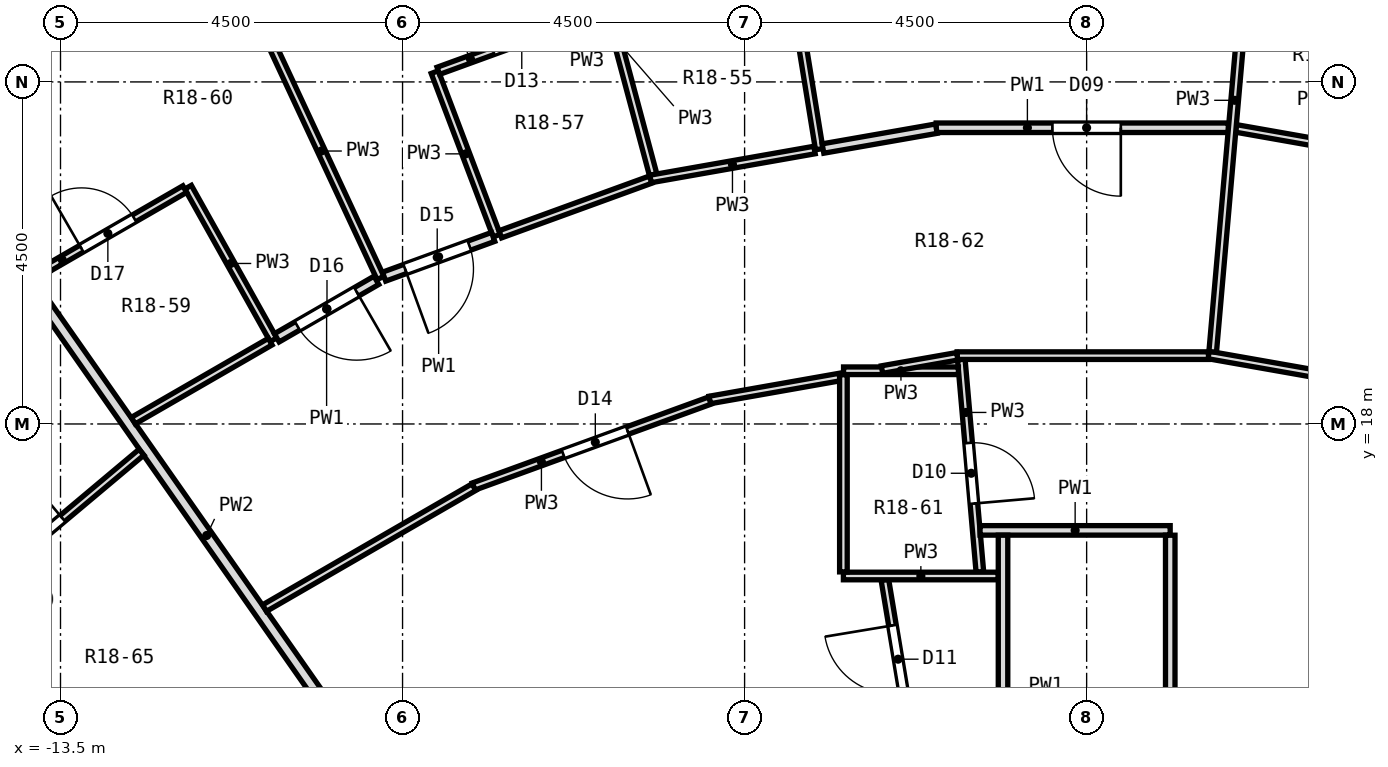
"""IFC4 building model, lengths in metres.
Left out: names, types, materials, properties, quantities, classifications, styles, units other than length and angle.
Written with IfcOpenShell. Run it as: python <this file> out.ifc"""

import sys

from ifc_helpers import new_model, si_unit, direction, frame, frame_2d, origin, place, context, subcontext, project, spatial, rectangle, extrude, element, fill, save


model = new_model("IFC4")
c1 = context("Model", 3, precision=1e-05, world=origin(), true_north=direction((0.0, 1.0)))
c2 = subcontext(c1, "Body", "Model", "MODEL_VIEW")
j1 = project(units=[si_unit("LENGTHUNIT", "METRE"), si_unit("PLANEANGLEUNIT", "RADIAN")], contexts=[c1])
p1 = place(None, origin())
s1 = spatial("IfcSite", under=j1, at=p1, CompositionType="ELEMENT")
p2 = place(p1, origin())
s2 = spatial("IfcBuilding", under=s1, at=p2, CompositionType="ELEMENT")
p3 = place(p2, frame((0.0, 0.0, 101.8)))
s3 = spatial("IfcBuildingStorey", under=s2, at=p3, CompositionType="ELEMENT", Elevation=101.8)
p4 = place(p3, frame((-1.649, 18.849, 0.0), z_axis=(0.0, 0.0, 1.0), x_axis=(0.087061215869, -0.996202963603, 0.0)))
e1 = element("IfcWall", 1, at=p4, inside=s3, PredefinedType="PARTITIONING", context=c2, shape_type="SweptSolid", body=[
    extrude(rectangle(XDim=2.807, YDim=0.1, at=frame_2d((1.404, 0.0))), origin(), (0.0, 0.0, 1.0), 2.8),
])
p5 = place(p4, frame((1.103, 0.0, 0.0)))
e2 = element("IfcOpeningElement", 2, at=p5, cuts=e1, PredefinedType="OPENING", context=c2, shape_type="SweptSolid", body=[
    extrude(rectangle(XDim=0.8, YDim=2.1, at=frame_2d((0.4, 1.05))), frame((0.0, 0.062, 0.0), z_axis=(0.0, -1.0, 0.0), x_axis=(1.0, 0.0, 0.0)), (0.0, 0.0, 1.0), 0.124),
])
p6 = place(p3, frame((-3.887, 23.885, 0.0), z_axis=(0.0, 0.0, 1.0), x_axis=(0.160403826344, -0.987051474085, 0.0)))
e3 = element("IfcWall", 3, at=p6, inside=s3, PredefinedType="PARTITIONING", context=c2, shape_type="SweptSolid", body=[
    extrude(rectangle(XDim=2.3, YDim=0.1, at=frame_2d((1.15, 0.0))), origin(), (0.0, 0.0, 1.0), 2.8),
])
p7 = place(p3, frame((-2.655, 15.951, 0.0), z_axis=(0.0, 0.0, 1.0), x_axis=(0.164012054584, -0.986458334625, 0.0)))
e4 = element("IfcWall", 4, at=p7, inside=s3, PredefinedType="PARTITIONING", context=c2, shape_type="SweptSolid", body=[
    extrude(rectangle(XDim=4.707, YDim=0.1, at=frame_2d((2.354, 0.0))), origin(), (0.0, 0.0, 1.0), 2.8),
])
p8 = place(p7, frame((0.61, 0.0, 0.0)))
e5 = element("IfcOpeningElement", 5, at=p8, cuts=e4, PredefinedType="OPENING", context=c2, shape_type="SweptSolid", body=[
    extrude(rectangle(XDim=0.9, YDim=2.1, at=frame_2d((0.45, 1.05))), frame((0.0, 0.062, 0.0), z_axis=(0.0, -1.0, 0.0), x_axis=(1.0, 0.0, 0.0)), (0.0, 0.0, 1.0), 0.124),
])
p9 = place(p3, frame((-6.642, 24.791, 0.0), z_axis=(0.0, 0.0, 1.0), x_axis=(0.258373404153, -0.966045125254, 0.0)))
e6 = element("IfcWall", 6, at=p9, inside=s3, PredefinedType="PARTITIONING", context=c2, shape_type="SweptSolid", body=[
    extrude(rectangle(XDim=3.634, YDim=0.1, at=frame_2d((1.817, 0.0))), origin(), (0.0, 0.0, 1.0), 2.8),
])
p10 = place(p3, frame((-8.576, 22.629, 0.0), z_axis=(0.0, 0.0, 1.0), x_axis=(0.354308635081, -0.935128542558, 0.0)))
e7 = element("IfcWall", 7, at=p10, inside=s3, PredefinedType="PARTITIONING", context=c2, shape_type="SweptSolid", body=[
    extrude(rectangle(XDim=2.3, YDim=0.1, at=frame_2d((1.15, 0.0))), origin(), (0.0, 0.0, 1.0), 2.8),
])
p11 = place(p3, frame((-10.847, 23.26, 0.0), z_axis=(0.0, 0.0, 1.0), x_axis=(0.422500901097, -0.906362503953, 0.0)))
e8 = element("IfcWall", 8, at=p11, inside=s3, PredefinedType="PARTITIONING", context=c2, shape_type="SweptSolid", body=[
    extrude(rectangle(XDim=3.684, YDim=0.1, at=frame_2d((1.842, 0.0))), origin(), (0.0, 0.0, 1.0), 2.8),
])
p12 = place(p3, frame((-11.822, 21.115, 0.0), z_axis=(0.0, 0.0, 1.0), x_axis=(0.488622759198, -0.872495157117, 0.0)))
e9 = element("IfcWall", 9, at=p12, inside=s3, PredefinedType="PARTITIONING", context=c2, shape_type="SweptSolid", body=[
    extrude(rectangle(XDim=2.3, YDim=0.1, at=frame_2d((1.15, 0.0))), origin(), (0.0, 0.0, 1.0), 2.8),
])
p13 = place(p3, frame((-13.896, 19.846, 0.0), z_axis=(0.0, 0.0, 1.0), x_axis=(0.573571733859, -0.819155336989, 0.0)))
e10 = element("IfcWall", 10, at=p13, inside=s3, PredefinedType="PARTITIONING", context=c2, shape_type="SweptSolid", body=[
    extrude(rectangle(XDim=8.088, YDim=0.15, at=frame_2d((4.044, 0.0))), origin(), (0.0, 0.0, 1.0), 2.8),
])
p14 = place(p3, frame((-15.731, 14.697, 0.0), z_axis=(0.0, 0.0, 1.0), x_axis=(0.730698385908, -0.682700423928, 0.0)))
e11 = element("IfcWall", 11, at=p14, inside=s3, PredefinedType="PARTITIONING", context=c2, shape_type="SweptSolid", body=[
    extrude(rectangle(XDim=3.026, YDim=0.1, at=frame_2d((1.513, 0.0))), origin(), (0.0, 0.0, 1.0), 2.8),
])
p15 = place(p3, frame((1.603, 18.908, 0.0), z_axis=(0.0, 0.0, 1.0), x_axis=(0.984831814927, -0.173511660439, 0.0)))
e12 = element("IfcWall", 12, at=p15, inside=s3, PredefinedType="PARTITIONING", context=c2, shape_type="SweptSolid", body=[
    extrude(rectangle(XDim=3.308, YDim=0.1, at=frame_2d((1.654, 0.0))), origin(), (0.0, 0.0, 1.0), 2.8),
])
p16 = place(p3, frame((1.965, 21.888, 0.0), z_axis=(0.0, 0.0, 1.0), x_axis=(0.984784733711, -0.173778676048, 0.0)))
e13 = element("IfcWall", 13, at=p16, inside=s3, PredefinedType="PARTITIONING", context=c2, shape_type="SweptSolid", body=[
    extrude(rectangle(XDim=2.092, YDim=0.1, at=frame_2d((1.046, 0.0))), origin(), (0.0, 0.0, 1.0), 2.8),
])
p17 = place(p3, frame((-3.2, 16.0, 0.0), z_axis=(0.0, 0.0, 1.0), x_axis=(1.0, 0.0, 0.0)))
e14 = element("IfcWall", 14, at=p17, inside=s3, PredefinedType="PARTITIONING", context=c2, shape_type="SweptSolid", body=[
    extrude(rectangle(XDim=2.037, YDim=0.1, at=frame_2d((1.019, 0.0))), origin(), (0.0, 0.0, 1.0), 2.8),
])
p18 = place(p3, frame((-1.402, 16.6, 0.0), z_axis=(0.0, 0.0, 1.0), x_axis=(1.0, 0.0, 0.0)))
e15 = element("IfcWall", 15, at=p18, inside=s3, PredefinedType="PARTITIONING", context=c2, shape_type="SweptSolid", body=[
    extrude(rectangle(XDim=2.501, YDim=0.125, at=frame_2d((1.251, 0.0))), origin(), (0.0, 0.0, 1.0), 2.8),
])
p19 = place(p3, frame((-3.198, 18.7, 0.0), z_axis=(0.0, 0.0, 1.0), x_axis=(1.0, 0.0, 0.0)))
e16 = element("IfcWall", 16, at=p19, inside=s3, PredefinedType="PARTITIONING", context=c2, shape_type="SweptSolid", body=[
    extrude(rectangle(XDim=1.511, YDim=0.1, at=frame_2d((0.755, 0.0))), origin(), (0.0, 0.0, 1.0), 2.8),
])
p20 = place(p3, frame((-1.704, 18.899, 0.0), z_axis=(0.0, 0.0, 1.0), x_axis=(1.0, 0.0, 0.0)))
e17 = element("IfcWall", 17, at=p20, inside=s3, PredefinedType="PARTITIONING", context=c2, shape_type="SweptSolid", body=[
    extrude(rectangle(XDim=3.307, YDim=0.1, at=frame_2d((1.653, 0.0))), origin(), (0.0, 0.0, 1.0), 2.8),
])
p21 = place(p3, frame((-1.979, 21.897, 0.0), z_axis=(0.0, 0.0, 1.0), x_axis=(1.0, 0.0, 0.0)))
e18 = element("IfcWall", 18, at=p21, inside=s3, PredefinedType="PARTITIONING", context=c2, shape_type="SweptSolid", body=[
    extrude(rectangle(XDim=3.844, YDim=0.125, at=frame_2d((1.922, 0.0))), origin(), (0.0, 0.0, 1.0), 2.8),
])
p22 = place(p21, frame((1.529, 0.0, 0.0)))
e19 = element("IfcOpeningElement", 19, at=p22, cuts=e18, PredefinedType="OPENING", context=c2, shape_type="SweptSolid", body=[
    extrude(rectangle(XDim=0.9, YDim=2.1, at=frame_2d((0.45, 1.05))), frame((0.0, 0.074, 0.0), z_axis=(0.0, -1.0, 0.0), x_axis=(1.0, 0.0, 0.0)), (0.0, 0.0, 1.0), 0.149),
])
p23 = place(p3, frame((-3.469, 21.624, 0.0), z_axis=(0.0, 0.0, 1.0), x_axis=(0.984977719449, 0.172681476106, 0.0)))
e20 = element("IfcWall", 20, at=p23, inside=s3, PredefinedType="PARTITIONING", context=c2, shape_type="SweptSolid", body=[
    extrude(rectangle(XDim=1.514, YDim=0.125, at=frame_2d((0.757, 0.0))), origin(), (0.0, 0.0, 1.0), 2.8),
])
p24 = place(p3, frame((-4.96, 18.315, 0.0), z_axis=(0.0, 0.0, 1.0), x_axis=(0.984767989426, 0.173873537385, 0.0)))
e21 = element("IfcWall", 21, at=p24, inside=s3, PredefinedType="PARTITIONING", context=c2, shape_type="SweptSolid", body=[
    extrude(rectangle(XDim=1.737, YDim=0.1, at=frame_2d((0.868, 0.0))), origin(), (0.0, 0.0, 1.0), 2.8),
])
p25 = place(p3, frame((-2.692, 18.716, 0.0), z_axis=(0.0, 0.0, 1.0), x_axis=(0.984773780307, 0.173840736366, 0.0)))
e22 = element("IfcWall", 22, at=p25, inside=s3, PredefinedType="PARTITIONING", context=c2, shape_type="SweptSolid", body=[
    extrude(rectangle(XDim=1.006, YDim=0.1, at=frame_2d((0.503, 0.0))), origin(), (0.0, 0.0, 1.0), 2.8),
])
p26 = place(p3, frame((-5.739, 21.223, 0.0), z_axis=(0.0, 0.0, 1.0), x_axis=(0.984781317039, 0.173798036845, 0.0)))
e23 = element("IfcWall", 23, at=p26, inside=s3, PredefinedType="PARTITIONING", context=c2, shape_type="SweptSolid", body=[
    extrude(rectangle(XDim=2.193, YDim=0.1, at=frame_2d((1.096, 0.0))), origin(), (0.0, 0.0, 1.0), 2.8),
])
p27 = place(p3, frame((-8.066, 17.177, 0.0), z_axis=(0.0, 0.0, 1.0), x_axis=(0.939726606236, 0.341926754629, 0.0)))
e24 = element("IfcWall", 24, at=p27, inside=s3, PredefinedType="PARTITIONING", context=c2, shape_type="SweptSolid", body=[
    extrude(rectangle(XDim=3.308, YDim=0.1, at=frame_2d((1.654, 0.0))), origin(), (0.0, 0.0, 1.0), 2.8),
])
p28 = place(p27, frame((1.254, 0.0, 0.0)))
e25 = element("IfcOpeningElement", 25, at=p28, cuts=e24, PredefinedType="OPENING", context=c2, shape_type="SweptSolid", body=[
    extrude(rectangle(XDim=0.9, YDim=2.1, at=frame_2d((0.45, 1.05))), frame((0.0, 0.062, 0.0), z_axis=(0.0, -1.0, 0.0), x_axis=(1.0, 0.0, 0.0)), (0.0, 0.0, 1.0), 0.124),
])
p29 = place(p3, frame((-7.714, 20.495, 0.0), z_axis=(0.0, 0.0, 1.0), x_axis=(0.939725675468, 0.341929312674, 0.0)))
e26 = element("IfcWall", 26, at=p29, inside=s3, PredefinedType="PARTITIONING", context=c2, shape_type="SweptSolid", body=[
    extrude(rectangle(XDim=2.105, YDim=0.1, at=frame_2d((1.052, 0.0))), origin(), (0.0, 0.0, 1.0), 2.8),
])
p30 = place(p3, frame((-9.243, 19.938, 0.0), z_axis=(0.0, 0.0, 1.0), x_axis=(0.939611268692, 0.342243573711, 0.0)))
e27 = element("IfcWall", 27, at=p30, inside=s3, PredefinedType="PARTITIONING", context=c2, shape_type="SweptSolid", body=[
    extrude(rectangle(XDim=1.527, YDim=0.125, at=frame_2d((0.764, 0.0))), origin(), (0.0, 0.0, 1.0), 2.8),
])
p31 = place(p30, frame((0.294, 0.0, 0.0)))
e28 = element("IfcOpeningElement", 28, at=p31, cuts=e27, PredefinedType="OPENING", context=c2, shape_type="SweptSolid", body=[
    extrude(rectangle(XDim=0.9, YDim=2.1, at=frame_2d((0.45, 1.05))), frame((0.0, 0.074, 0.0), z_axis=(0.0, -1.0, 0.0), x_axis=(1.0, 0.0, 0.0)), (0.0, 0.0, 1.0), 0.149),
])
p32 = place(p3, frame((-8.529, 22.646, 0.0), z_axis=(0.0, 0.0, 1.0), x_axis=(0.939707949959, 0.341978023831, 0.0)))
e29 = element("IfcWall", 29, at=p32, inside=s3, PredefinedType="PARTITIONING", context=c2, shape_type="SweptSolid", body=[
    extrude(rectangle(XDim=2.336, YDim=0.1, at=frame_2d((1.168, 0.0))), origin(), (0.0, 0.0, 1.0), 2.8),
])
p33 = place(p32, frame((0.768, 0.0, 0.0)))
e30 = element("IfcOpeningElement", 30, at=p33, cuts=e29, PredefinedType="OPENING", context=c2, shape_type="SweptSolid", body=[
    extrude(rectangle(XDim=0.8, YDim=2.1, at=frame_2d((0.4, 1.05))), frame((0.0, 0.062, 0.0), z_axis=(0.0, -1.0, 0.0), x_axis=(1.0, 0.0, 0.0)), (0.0, 0.0, 1.0), 0.124),
])
p34 = place(p3, frame((-10.816, 15.578, 0.0), z_axis=(0.0, 0.0, 1.0), x_axis=(0.865900530636, 0.500216224292, 0.0)))
e31 = element("IfcWall", 31, at=p34, inside=s3, PredefinedType="PARTITIONING", context=c2, shape_type="SweptSolid", body=[
    extrude(rectangle(XDim=3.181, YDim=0.1, at=frame_2d((1.591, 0.0))), origin(), (0.0, 0.0, 1.0), 2.8),
])
p35 = place(p3, frame((-12.542, 18.044, 0.0), z_axis=(0.0, 0.0, 1.0), x_axis=(0.866154304779, 0.499776670437, 0.0)))
e32 = element("IfcWall", 32, at=p35, inside=s3, PredefinedType="PARTITIONING", context=c2, shape_type="SweptSolid", body=[
    extrude(rectangle(XDim=2.079, YDim=0.1, at=frame_2d((1.04, 0.0))), origin(), (0.0, 0.0, 1.0), 2.8),
])
p36 = place(p3, frame((-10.655, 19.133, 0.0), z_axis=(0.0, 0.0, 1.0), x_axis=(0.866040510187, 0.49997383403, 0.0)))
e33 = element("IfcWall", 33, at=p36, inside=s3, PredefinedType="PARTITIONING", context=c2, shape_type="SweptSolid", body=[
    extrude(rectangle(XDim=1.513, YDim=0.125, at=frame_2d((0.757, 0.0))), origin(), (0.0, 0.0, 1.0), 2.8),
])
p37 = place(p36, frame((0.313, 0.0, 0.0)))
e34 = element("IfcOpeningElement", 34, at=p37, cuts=e33, PredefinedType="OPENING", context=c2, shape_type="SweptSolid", body=[
    extrude(rectangle(XDim=0.9, YDim=2.1, at=frame_2d((0.45, 1.05))), frame((0.0, 0.074, 0.0), z_axis=(0.0, -1.0, 0.0), x_axis=(1.0, 0.0, 0.0)), (0.0, 0.0, 1.0), 0.149),
])
p38 = place(p3, frame((-13.867, 19.935, 0.0), z_axis=(0.0, 0.0, 1.0), x_axis=(0.866057184078, 0.499944950877, 0.0)))
e35 = element("IfcWall", 35, at=p38, inside=s3, PredefinedType="PARTITIONING", context=c2, shape_type="SweptSolid", body=[
    extrude(rectangle(XDim=2.311, YDim=0.1, at=frame_2d((1.156, 0.0))), origin(), (0.0, 0.0, 1.0), 2.8),
])
p39 = place(p38, frame((0.743, 0.0, 0.0)))
e36 = element("IfcOpeningElement", 36, at=p39, cuts=e35, PredefinedType="OPENING", context=c2, shape_type="SweptSolid", body=[
    extrude(rectangle(XDim=0.8, YDim=2.1, at=frame_2d((0.4, 1.05))), frame((0.0, 0.062, 0.0), z_axis=(0.0, -1.0, 0.0), x_axis=(1.0, 0.0, 0.0)), (0.0, 0.0, 1.0), 0.124),
])
p40 = place(p3, frame((-15.298, 15.226, 0.0), z_axis=(0.0, 0.0, 1.0), x_axis=(0.766080513043, 0.642744620775, 0.0)))
e37 = element("IfcWall", 37, at=p40, inside=s3, PredefinedType="PARTITIONING", context=c2, shape_type="SweptSolid", body=[
    extrude(rectangle(XDim=3.737, YDim=0.1, at=frame_2d((1.869, 0.0))), origin(), (0.0, 0.0, 1.0), 2.8),
])
p41 = place(p40, frame((1.482, 0.0, 0.0)))
e38 = element("IfcOpeningElement", 38, at=p41, cuts=e37, PredefinedType="OPENING", context=c2, shape_type="SweptSolid", body=[
    extrude(rectangle(XDim=0.9, YDim=2.1, at=frame_2d((0.45, 1.05))), frame((0.0, 0.062, 0.0), z_axis=(0.0, -1.0, 0.0), x_axis=(1.0, 0.0, 0.0)), (0.0, 0.0, 1.0), 0.124),
])
p42 = place(p3, frame((1.658, 18.949, 0.0), z_axis=(0.0, 0.0, 1.0), x_axis=(0.087052988713, 0.996203682565, 0.0)))
e39 = element("IfcWall", 39, at=p42, inside=s3, PredefinedType="PARTITIONING", context=c2, shape_type="SweptSolid", body=[
    extrude(rectangle(XDim=6.644, YDim=0.1, at=frame_2d((3.322, 0.0))), origin(), (0.0, 0.0, 1.0), 2.8),
])
for number, where, z_axis, x_axis in (
    (40, (1.1, 11.445, 0.0), (0.0, 0.0, 1.0), (0.0, 1.0, 0.0)),
    (41, (-1.1, 11.445, 0.0), (0.0, 0.0, 1.0), (0.0, 1.0, 0.0)),
):
    element("IfcWall", number, at=place(p3, frame(where, z_axis=z_axis, x_axis=x_axis)), inside=s3, PredefinedType="PARTITIONING", context=c2, shape_type="SweptSolid", body=[
        extrude(rectangle(XDim=5.092, YDim=0.125, at=frame_2d((2.546, 0.0))), origin(), (0.0, 0.0, 1.0), 2.8),
    ])
p43 = place(p3, frame((-3.2, 16.054, 0.0), z_axis=(0.0, 0.0, 1.0), x_axis=(0.0, 1.0, 0.0)))
e42 = element("IfcWall", 42, at=p43, inside=s3, PredefinedType="PARTITIONING", context=c2, shape_type="SweptSolid", body=[
    extrude(rectangle(XDim=2.594, YDim=0.1, at=frame_2d((1.297, 0.0))), origin(), (0.0, 0.0, 1.0), 2.8),
])
p44 = place(p22, frame((0.9, 0.0, 0.0), z_axis=(0.0, 0.0, 1.0), x_axis=(-1.0, 0.0, 0.0)))
e43 = element("IfcDoor", 43, at=p44, inside=s3, OperationType="SINGLE_SWING_LEFT", PredefinedType="DOOR", context=c2, shape_type="SweptSolid", body=[
    extrude(rectangle(XDim=0.9, YDim=2.1, at=frame_2d((0.45, 1.05))), frame((0.0, 0.025, 0.0), z_axis=(0.0, -1.0, 0.0), x_axis=(1.0, 0.0, 0.0)), (0.0, 0.0, 1.0), 0.05),
])
fill(e19, e43)
p45 = place(p5, origin())
e44 = element("IfcDoor", 44, at=p45, inside=s3, OperationType="SINGLE_SWING_RIGHT", PredefinedType="DOOR", context=c2, shape_type="SweptSolid", body=[
    extrude(rectangle(XDim=0.8, YDim=2.1, at=frame_2d((0.4, 1.05))), frame((0.0, 0.025, 0.0), z_axis=(0.0, -1.0, 0.0), x_axis=(1.0, 0.0, 0.0)), (0.0, 0.0, 1.0), 0.05),
])
fill(e2, e44)
p46 = place(p8, frame((0.9, 0.0, 0.0), z_axis=(0.0, 0.0, 1.0), x_axis=(-1.0, 0.0, 0.0)))
e45 = element("IfcDoor", 45, at=p46, inside=s3, OperationType="SINGLE_SWING_RIGHT", PredefinedType="DOOR", context=c2, shape_type="SweptSolid", body=[
    extrude(rectangle(XDim=0.9, YDim=2.1, at=frame_2d((0.45, 1.05))), frame((0.0, 0.025, 0.0), z_axis=(0.0, -1.0, 0.0), x_axis=(1.0, 0.0, 0.0)), (0.0, 0.0, 1.0), 0.05),
])
fill(e5, e45)
p47 = place(p33, origin())
e46 = element("IfcDoor", 46, at=p47, inside=s3, OperationType="SINGLE_SWING_LEFT", PredefinedType="DOOR", context=c2, shape_type="SweptSolid", body=[
    extrude(rectangle(XDim=0.8, YDim=2.1, at=frame_2d((0.4, 1.05))), frame((0.0, 0.025, 0.0), z_axis=(0.0, -1.0, 0.0), x_axis=(1.0, 0.0, 0.0)), (0.0, 0.0, 1.0), 0.05),
])
fill(e30, e46)
p48 = place(p28, frame((0.9, 0.0, 0.0), z_axis=(0.0, 0.0, 1.0), x_axis=(-1.0, 0.0, 0.0)))
e47 = element("IfcDoor", 47, at=p48, inside=s3, OperationType="SINGLE_SWING_LEFT", PredefinedType="DOOR", context=c2, shape_type="SweptSolid", body=[
    extrude(rectangle(XDim=0.9, YDim=2.1, at=frame_2d((0.45, 1.05))), frame((0.0, 0.025, 0.0), z_axis=(0.0, -1.0, 0.0), x_axis=(1.0, 0.0, 0.0)), (0.0, 0.0, 1.0), 0.05),
])
fill(e25, e47)
p49 = place(p31, frame((0.9, 0.0, 0.0), z_axis=(0.0, 0.0, 1.0), x_axis=(-1.0, 0.0, 0.0)))
e48 = element("IfcDoor", 48, at=p49, inside=s3, OperationType="SINGLE_SWING_RIGHT", PredefinedType="DOOR", context=c2, shape_type="SweptSolid", body=[
    extrude(rectangle(XDim=0.9, YDim=2.1, at=frame_2d((0.45, 1.05))), frame((0.0, 0.025, 0.0), z_axis=(0.0, -1.0, 0.0), x_axis=(1.0, 0.0, 0.0)), (0.0, 0.0, 1.0), 0.05),
])
fill(e28, e48)
p50 = place(p37, frame((0.9, 0.0, 0.0), z_axis=(0.0, 0.0, 1.0), x_axis=(-1.0, 0.0, 0.0)))
e49 = element("IfcDoor", 49, at=p50, inside=s3, OperationType="SINGLE_SWING_LEFT", PredefinedType="DOOR", context=c2, shape_type="SweptSolid", body=[
    extrude(rectangle(XDim=0.9, YDim=2.1, at=frame_2d((0.45, 1.05))), frame((0.0, 0.025, 0.0), z_axis=(0.0, -1.0, 0.0), x_axis=(1.0, 0.0, 0.0)), (0.0, 0.0, 1.0), 0.05),
])
fill(e34, e49)
p51 = place(p39, origin())
e50 = element("IfcDoor", 50, at=p51, inside=s3, OperationType="SINGLE_SWING_LEFT", PredefinedType="DOOR", context=c2, shape_type="SweptSolid", body=[
    extrude(rectangle(XDim=0.8, YDim=2.1, at=frame_2d((0.4, 1.05))), frame((0.0, 0.025, 0.0), z_axis=(0.0, -1.0, 0.0), x_axis=(1.0, 0.0, 0.0)), (0.0, 0.0, 1.0), 0.05),
])
fill(e36, e50)
p52 = place(p41, origin())
e51 = element("IfcDoor", 51, at=p52, inside=s3, OperationType="SINGLE_SWING_RIGHT", PredefinedType="DOOR", context=c2, shape_type="SweptSolid", body=[
    extrude(rectangle(XDim=0.9, YDim=2.1, at=frame_2d((0.45, 1.05))), frame((0.0, 0.025, 0.0), z_axis=(0.0, -1.0, 0.0), x_axis=(1.0, 0.0, 0.0)), (0.0, 0.0, 1.0), 0.05),
])
fill(e38, e51)
save(model, sys.argv[1])
